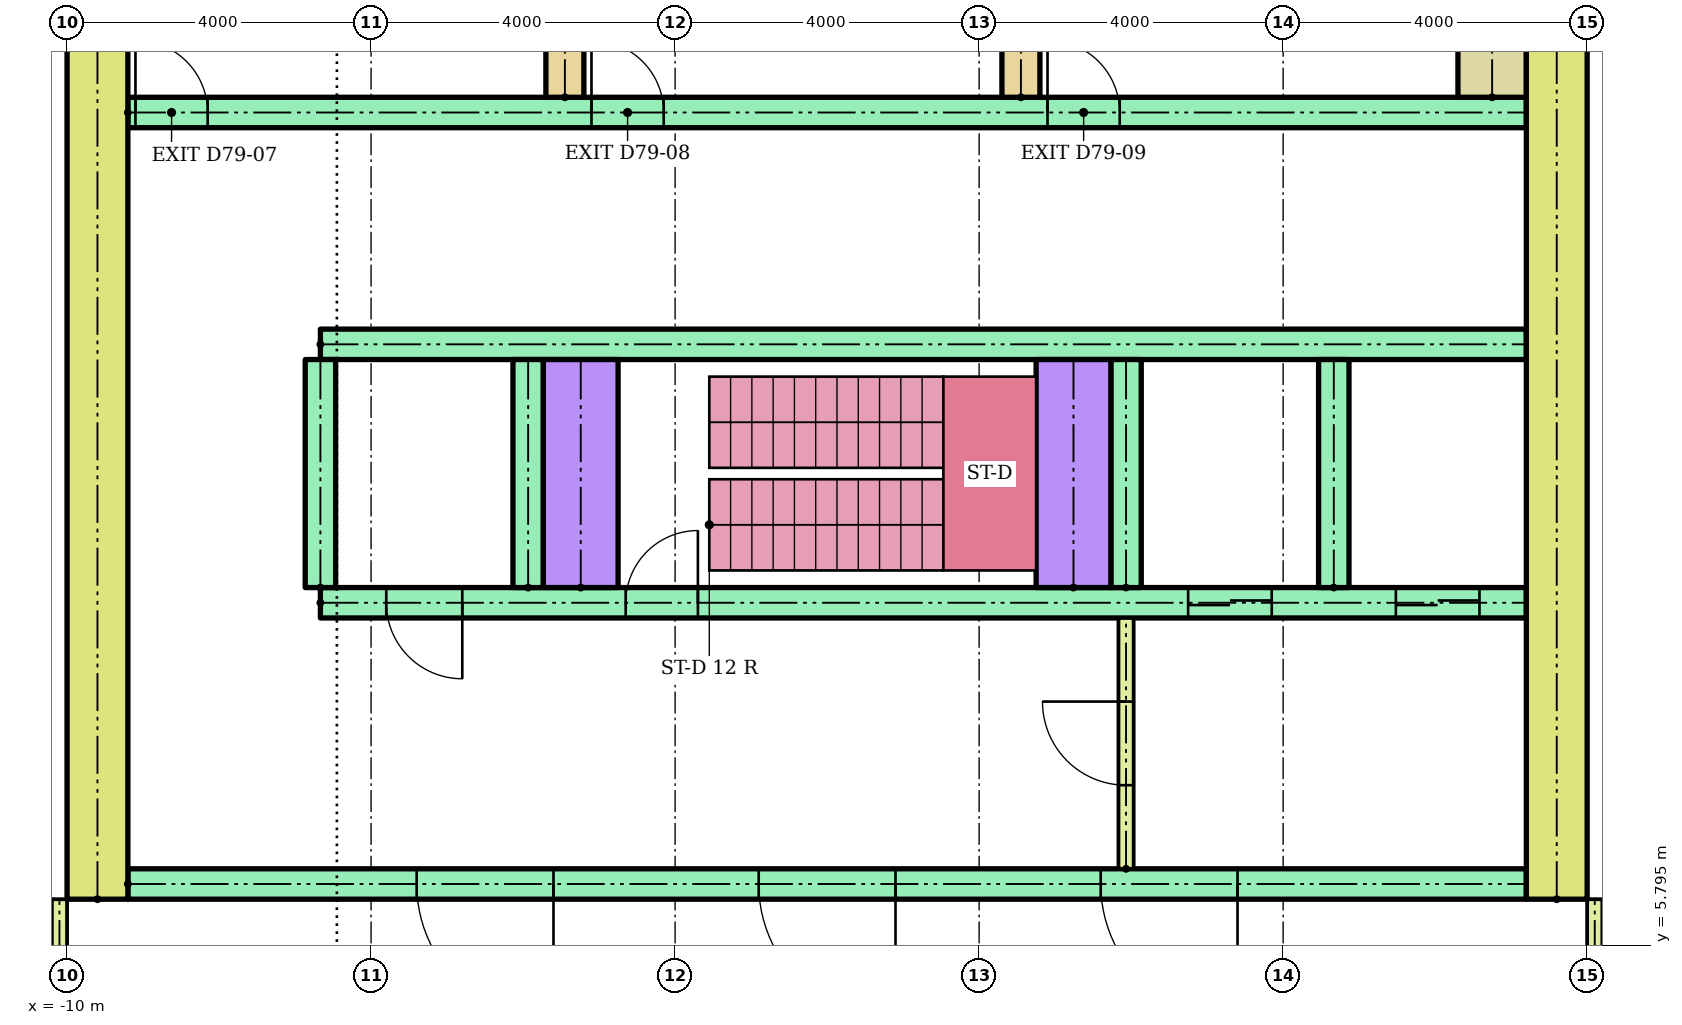
"""IFC4 building model, lengths in metres.
Left out: names, types, materials, properties, quantities, classifications, styles, units other than length and angle.
Written with IfcOpenShell. Run it as: python <this file> out.ifc"""

import sys

from ifc_helpers import new_model, si_unit, direction, frame, frame_2d, origin, place, context, subcontext, project, spatial, rectangle, extrude, element, fill, save


model = new_model("IFC4")
c1 = context("Model", 3, precision=1e-05, world=origin(), true_north=direction((0.0, 1.0)))
c2 = subcontext(c1, "Body", "Model", "MODEL_VIEW")
j1 = project(units=[si_unit("LENGTHUNIT", "METRE"), si_unit("PLANEANGLEUNIT", "RADIAN")], contexts=[c1])
p1 = place(None, origin())
s1 = spatial("IfcSite", under=j1, at=p1, CompositionType="ELEMENT")
p2 = place(p1, origin())
s2 = spatial("IfcBuilding", under=s1, at=p2, CompositionType="ELEMENT")
p3 = place(p2, frame((0.0, 0.0, 309.2)))
s3 = spatial("IfcBuildingStorey", under=s2, at=p3, CompositionType="ELEMENT", Elevation=309.2)
for number, where, z_axis, x_axis in (
    (1, (-9.6, 6.4, 0.0), (0.0, 0.0, 1.0), (0.0, 1.0, 0.0)),
    (2, (9.6, 6.4, 0.0), (0.0, 0.0, 1.0), (0.0, 1.0, 0.0)),
):
    element("IfcWall", number, at=place(p3, frame(where, z_axis=z_axis, x_axis=x_axis)), inside=s3, PredefinedType="SHEAR", context=c2, shape_type="SweptSolid", body=[
        extrude(rectangle(XDim=13.6, YDim=0.8, at=frame_2d((6.8, 0.0))), origin(), (0.0, 0.0, 1.0), 3.78),
    ])
p4 = place(p3, frame((-9.2, 6.6, 0.0)))
e3 = element("IfcWall", 3, at=p4, inside=s3, PredefinedType="SHEAR", context=c2, shape_type="SweptSolid", body=[
    extrude(rectangle(XDim=18.4, YDim=0.4, at=frame_2d((9.2, 0.0))), origin(), (0.0, 0.0, 1.0), 3.78),
])
p5 = place(p4, frame((8.3, 0.0, 0.0)))
e4 = element("IfcOpeningElement", 4, at=p5, cuts=e3, PredefinedType="OPENING", context=c2, shape_type="SweptSolid", body=[
    extrude(rectangle(XDim=1.8, YDim=2.1, at=frame_2d((0.9, 1.05))), frame((0.0, 0.21, 0.0), z_axis=(0.0, -1.0, 0.0), x_axis=(1.0, 0.0, 0.0)), (0.0, 0.0, 1.0), 0.42),
])
p6 = place(p4, frame((3.8, 0.0, 0.0)))
e5 = element("IfcOpeningElement", 5, at=p6, cuts=e3, PredefinedType="OPENING", context=c2, shape_type="SweptSolid", body=[
    extrude(rectangle(XDim=1.8, YDim=2.1, at=frame_2d((0.9, 1.05))), frame((0.0, 0.21, 0.0), z_axis=(0.0, -1.0, 0.0), x_axis=(1.0, 0.0, 0.0)), (0.0, 0.0, 1.0), 0.42),
])
p7 = place(p4, frame((12.8, 0.0, 0.0)))
e6 = element("IfcOpeningElement", 6, at=p7, cuts=e3, PredefinedType="OPENING", context=c2, shape_type="SweptSolid", body=[
    extrude(rectangle(XDim=1.8, YDim=2.1, at=frame_2d((0.9, 1.05))), frame((0.0, 0.21, 0.0), z_axis=(0.0, -1.0, 0.0), x_axis=(1.0, 0.0, 0.0)), (0.0, 0.0, 1.0), 0.42),
])
p8 = place(p3, frame((-6.667, 10.3, 0.0)))
e7 = element("IfcWall", 7, at=p8, inside=s3, PredefinedType="SHEAR", context=c2, shape_type="SweptSolid", body=[
    extrude(rectangle(XDim=15.867, YDim=0.4, at=frame_2d((7.933, 0.0))), origin(), (0.0, 0.0, 1.0), 3.78),
])
p9 = place(p8, frame((11.417, 0.0, 0.0)))
e8 = element("IfcOpeningElement", 8, at=p9, cuts=e7, PredefinedType="OPENING", context=c2, shape_type="SweptSolid", body=[
    extrude(rectangle(XDim=1.1, YDim=2.1, at=frame_2d((0.55, 1.05))), frame((0.0, 0.21, 0.0), z_axis=(0.0, -1.0, 0.0), x_axis=(1.0, 0.0, 0.0)), (0.0, 0.0, 1.0), 0.42),
])
p10 = place(p8, frame((14.15, 0.0, 0.0)))
e9 = element("IfcOpeningElement", 9, at=p10, cuts=e7, PredefinedType="OPENING", context=c2, shape_type="SweptSolid", body=[
    extrude(rectangle(XDim=1.1, YDim=2.1, at=frame_2d((0.55, 1.05))), frame((0.0, 0.21, 0.0), z_axis=(0.0, -1.0, 0.0), x_axis=(1.0, 0.0, 0.0)), (0.0, 0.0, 1.0), 0.42),
])
p11 = place(p8, frame((0.867, 0.0, 0.0)))
e10 = element("IfcOpeningElement", 10, at=p11, cuts=e7, PredefinedType="OPENING", context=c2, shape_type="SweptSolid", body=[
    extrude(rectangle(XDim=1.0, YDim=2.1, at=frame_2d((0.5, 1.05))), frame((0.0, 0.21, 0.0), z_axis=(0.0, -1.0, 0.0), x_axis=(1.0, 0.0, 0.0)), (0.0, 0.0, 1.0), 0.42),
])
p12 = place(p8, frame((4.017, 0.0, 0.0)))
e11 = element("IfcOpeningElement", 11, at=p12, cuts=e7, PredefinedType="OPENING", context=c2, shape_type="SweptSolid", body=[
    extrude(rectangle(XDim=0.95, YDim=2.1, at=frame_2d((0.475, 1.05))), frame((0.0, 0.21, 0.0), z_axis=(0.0, -1.0, 0.0), x_axis=(1.0, 0.0, 0.0)), (0.0, 0.0, 1.0), 0.42),
])
p13 = place(p3, frame((-6.667, 13.7, 0.0)))
e12 = element("IfcWall", 12, at=p13, inside=s3, PredefinedType="SHEAR", context=c2, shape_type="SweptSolid", body=[
    extrude(rectangle(XDim=15.867, YDim=0.4, at=frame_2d((7.933, 0.0))), origin(), (0.0, 0.0, 1.0), 3.78),
])
for number, where, z_axis, x_axis in (
    (13, (-6.667, 10.5, 0.0), (0.0, 0.0, 1.0), (0.0, 1.0, 0.0)),
    (14, (-3.933, 10.5, 0.0), (0.0, 0.0, 1.0), (0.0, 1.0, 0.0)),
    (15, (3.933, 10.5, 0.0), (0.0, 0.0, 1.0), (0.0, 1.0, 0.0)),
    (16, (6.667, 10.5, 0.0), (0.0, 0.0, 1.0), (0.0, 1.0, 0.0)),
):
    element("IfcWall", number, at=place(p3, frame(where, z_axis=z_axis, x_axis=x_axis)), inside=s3, PredefinedType="SHEAR", context=c2, shape_type="SweptSolid", body=[
        extrude(rectangle(XDim=3.0, YDim=0.4, at=frame_2d((1.5, 0.0))), origin(), (0.0, 0.0, 1.0), 3.78),
    ])
for number, where, z_axis, x_axis in (
    (17, (-3.242, 10.5, 0.0), (0.0, 0.0, 1.0), (0.0, 1.0, 0.0)),
    (18, (3.242, 10.5, 0.0), (0.0, 0.0, 1.0), (0.0, 1.0, 0.0)),
):
    element("IfcWall", number, at=place(p3, frame(where, z_axis=z_axis, x_axis=x_axis)), inside=s3, PredefinedType="SHEAR", context=c2, shape_type="SweptSolid", body=[
        extrude(rectangle(XDim=3.0, YDim=0.983, at=frame_2d((1.5, 0.0))), origin(), (0.0, 0.0, 1.0), 3.78),
    ])
p14 = place(p3, frame((3.933, 6.8, 0.0), z_axis=(0.0, 0.0, 1.0), x_axis=(0.0, 1.0, 0.0)))
e19 = element("IfcWall", 19, at=p14, inside=s3, PredefinedType="PARTITIONING", context=c2, shape_type="SweptSolid", body=[
    extrude(rectangle(XDim=3.3, YDim=0.2, at=frame_2d((1.65, 0.0))), origin(), (0.0, 0.0, 1.0), 3.78),
])
p15 = place(p14, frame((1.1, 0.0, 0.0)))
e20 = element("IfcOpeningElement", 20, at=p15, cuts=e19, PredefinedType="OPENING", context=c2, shape_type="SweptSolid", body=[
    extrude(rectangle(XDim=1.1, YDim=2.1, at=frame_2d((0.55, 1.05))), frame((0.0, 0.11, 0.0), z_axis=(0.0, -1.0, 0.0), x_axis=(1.0, 0.0, 0.0)), (0.0, 0.0, 1.0), 0.22),
])
p16 = place(p3, frame((-9.2, 16.75, 0.0)))
e21 = element("IfcWall", 21, at=p16, inside=s3, PredefinedType="SHEAR", context=c2, shape_type="SweptSolid", body=[
    extrude(rectangle(XDim=18.4, YDim=0.4, at=frame_2d((9.2, 0.0))), origin(), (0.0, 0.0, 1.0), 3.78),
])
p17 = place(p16, frame((0.1, 0.0, 0.0)))
e22 = element("IfcOpeningElement", 22, at=p17, cuts=e21, PredefinedType="OPENING", context=c2, shape_type="SweptSolid", body=[
    extrude(rectangle(XDim=0.95, YDim=2.1, at=frame_2d((0.475, 1.05))), frame((0.0, 0.21, 0.0), z_axis=(0.0, -1.0, 0.0), x_axis=(1.0, 0.0, 0.0)), (0.0, 0.0, 1.0), 0.42),
])
p18 = place(p16, frame((6.1, 0.0, 0.0)))
e23 = element("IfcOpeningElement", 23, at=p18, cuts=e21, PredefinedType="OPENING", context=c2, shape_type="SweptSolid", body=[
    extrude(rectangle(XDim=0.95, YDim=2.1, at=frame_2d((0.475, 1.05))), frame((0.0, 0.21, 0.0), z_axis=(0.0, -1.0, 0.0), x_axis=(1.0, 0.0, 0.0)), (0.0, 0.0, 1.0), 0.42),
])
p19 = place(p16, frame((12.1, 0.0, 0.0)))
e24 = element("IfcOpeningElement", 24, at=p19, cuts=e21, PredefinedType="OPENING", context=c2, shape_type="SweptSolid", body=[
    extrude(rectangle(XDim=0.95, YDim=2.1, at=frame_2d((0.475, 1.05))), frame((0.0, 0.21, 0.0), z_axis=(0.0, -1.0, 0.0), x_axis=(1.0, 0.0, 0.0)), (0.0, 0.0, 1.0), 0.42),
])
for number, where, z_axis, x_axis in (
    (25, (-3.45, 16.95, 0.0), (0.0, 0.0, 1.0), (0.0, 1.0, 0.0)),
    (26, (2.55, 16.95, 0.0), (0.0, 0.0, 1.0), (0.0, 1.0, 0.0)),
):
    element("IfcWall", number, at=place(p3, frame(where, z_axis=z_axis, x_axis=x_axis)), inside=s3, PredefinedType="SHEAR", context=c2, shape_type="SweptSolid", body=[
        extrude(rectangle(XDim=2.55, YDim=0.5, at=frame_2d((1.275, 0.0))), origin(), (0.0, 0.0, 1.0), 3.78),
    ])
p20 = place(p3, frame((8.75, 16.95, 0.0), z_axis=(0.0, 0.0, 1.0), x_axis=(0.0, 1.0, 0.0)))
e27 = element("IfcWall", 27, at=p20, inside=s3, PredefinedType="SHEAR", context=c2, shape_type="SweptSolid", body=[
    extrude(rectangle(XDim=2.55, YDim=0.9, at=frame_2d((1.275, 0.0))), origin(), (0.0, 0.0, 1.0), 3.78),
])
for number, where, z_axis, x_axis in (
    (28, (-10.1, 1.5, 0.0), (0.0, 0.0, 1.0), (0.0, 1.0, 0.0)),
    (29, (10.1, 1.5, 0.0), (0.0, 0.0, 1.0), (0.0, 1.0, 0.0)),
):
    element("IfcWall", number, at=place(p3, frame(where, z_axis=z_axis, x_axis=x_axis)), inside=s3, PredefinedType="PARTITIONING", context=c2, shape_type="SweptSolid", body=[
        extrude(rectangle(XDim=4.9, YDim=0.2, at=frame_2d((2.45, 0.0))), origin(), (0.0, 0.0, 1.0), 3.78),
    ])
p21 = place(p5, frame((1.8, 0.0, 0.0), z_axis=(0.0, 0.0, 1.0), x_axis=(-1.0, 0.0, 0.0)))
e30 = element("IfcDoor", 30, at=p21, inside=s3, OperationType="DOUBLE_DOOR_SINGLE_SWING", PredefinedType="DOOR", context=c2, shape_type="SweptSolid", body=[
    extrude(rectangle(XDim=1.8, YDim=2.1, at=frame_2d((0.9, 1.05))), frame((0.0, 0.025, 0.0), z_axis=(0.0, -1.0, 0.0), x_axis=(1.0, 0.0, 0.0)), (0.0, 0.0, 1.0), 0.05),
])
fill(e4, e30)
p22 = place(p6, frame((1.8, 0.0, 0.0), z_axis=(0.0, 0.0, 1.0), x_axis=(-1.0, 0.0, 0.0)))
e31 = element("IfcDoor", 31, at=p22, inside=s3, OperationType="DOUBLE_DOOR_SINGLE_SWING", PredefinedType="DOOR", context=c2, shape_type="SweptSolid", body=[
    extrude(rectangle(XDim=1.8, YDim=2.1, at=frame_2d((0.9, 1.05))), frame((0.0, 0.025, 0.0), z_axis=(0.0, -1.0, 0.0), x_axis=(1.0, 0.0, 0.0)), (0.0, 0.0, 1.0), 0.05),
])
fill(e5, e31)
p23 = place(p7, frame((1.8, 0.0, 0.0), z_axis=(0.0, 0.0, 1.0), x_axis=(-1.0, 0.0, 0.0)))
e32 = element("IfcDoor", 32, at=p23, inside=s3, OperationType="DOUBLE_DOOR_SINGLE_SWING", PredefinedType="DOOR", context=c2, shape_type="SweptSolid", body=[
    extrude(rectangle(XDim=1.8, YDim=2.1, at=frame_2d((0.9, 1.05))), frame((0.0, 0.025, 0.0), z_axis=(0.0, -1.0, 0.0), x_axis=(1.0, 0.0, 0.0)), (0.0, 0.0, 1.0), 0.05),
])
fill(e6, e32)
p24 = place(p9, origin())
e33 = element("IfcDoor", 33, at=p24, inside=s3, OperationType="SLIDING_TO_LEFT", PredefinedType="DOOR", context=c2, shape_type="SweptSolid", body=[
    extrude(rectangle(XDim=1.1, YDim=2.1, at=frame_2d((0.55, 1.05))), frame((0.0, 0.025, 0.0), z_axis=(0.0, -1.0, 0.0), x_axis=(1.0, 0.0, 0.0)), (0.0, 0.0, 1.0), 0.05),
])
fill(e8, e33)
p25 = place(p10, origin())
e34 = element("IfcDoor", 34, at=p25, inside=s3, OperationType="SLIDING_TO_LEFT", PredefinedType="DOOR", context=c2, shape_type="SweptSolid", body=[
    extrude(rectangle(XDim=1.1, YDim=2.1, at=frame_2d((0.55, 1.05))), frame((0.0, 0.025, 0.0), z_axis=(0.0, -1.0, 0.0), x_axis=(1.0, 0.0, 0.0)), (0.0, 0.0, 1.0), 0.05),
])
fill(e9, e34)
p26 = place(p11, frame((1.0, 0.0, 0.0), z_axis=(0.0, 0.0, 1.0), x_axis=(-1.0, 0.0, 0.0)))
e35 = element("IfcDoor", 35, at=p26, inside=s3, OperationType="SINGLE_SWING_RIGHT", PredefinedType="DOOR", context=c2, shape_type="SweptSolid", body=[
    extrude(rectangle(XDim=1.0, YDim=2.1, at=frame_2d((0.5, 1.05))), frame((0.0, 0.025, 0.0), z_axis=(0.0, -1.0, 0.0), x_axis=(1.0, 0.0, 0.0)), (0.0, 0.0, 1.0), 0.05),
])
fill(e10, e35)
p27 = place(p12, origin())
e36 = element("IfcDoor", 36, at=p27, inside=s3, OperationType="SINGLE_SWING_RIGHT", PredefinedType="DOOR", context=c2, shape_type="SweptSolid", body=[
    extrude(rectangle(XDim=0.95, YDim=2.1, at=frame_2d((0.475, 1.05))), frame((0.0, 0.025, 0.0), z_axis=(0.0, -1.0, 0.0), x_axis=(1.0, 0.0, 0.0)), (0.0, 0.0, 1.0), 0.05),
])
fill(e11, e36)
p28 = place(p15, origin())
e37 = element("IfcDoor", 37, at=p28, inside=s3, OperationType="SINGLE_SWING_RIGHT", PredefinedType="DOOR", context=c2, shape_type="SweptSolid", body=[
    extrude(rectangle(XDim=1.1, YDim=2.1, at=frame_2d((0.55, 1.05))), frame((0.0, 0.025, 0.0), z_axis=(0.0, -1.0, 0.0), x_axis=(1.0, 0.0, 0.0)), (0.0, 0.0, 1.0), 0.05),
])
fill(e20, e37)
p29 = place(p17, origin())
e38 = element("IfcDoor", 38, at=p29, inside=s3, OperationType="SINGLE_SWING_LEFT", PredefinedType="DOOR", context=c2, shape_type="SweptSolid", body=[
    extrude(rectangle(XDim=0.95, YDim=2.1, at=frame_2d((0.475, 1.05))), frame((0.0, 0.025, 0.0), z_axis=(0.0, -1.0, 0.0), x_axis=(1.0, 0.0, 0.0)), (0.0, 0.0, 1.0), 0.05),
])
fill(e22, e38)
p30 = place(p18, origin())
e39 = element("IfcDoor", 39, at=p30, inside=s3, OperationType="SINGLE_SWING_LEFT", PredefinedType="DOOR", context=c2, shape_type="SweptSolid", body=[
    extrude(rectangle(XDim=0.95, YDim=2.1, at=frame_2d((0.475, 1.05))), frame((0.0, 0.025, 0.0), z_axis=(0.0, -1.0, 0.0), x_axis=(1.0, 0.0, 0.0)), (0.0, 0.0, 1.0), 0.05),
])
fill(e23, e39)
p31 = place(p19, origin())
e40 = element("IfcDoor", 40, at=p31, inside=s3, OperationType="SINGLE_SWING_LEFT", PredefinedType="DOOR", context=c2, shape_type="SweptSolid", body=[
    extrude(rectangle(XDim=0.95, YDim=2.1, at=frame_2d((0.475, 1.05))), frame((0.0, 0.025, 0.0), z_axis=(0.0, -1.0, 0.0), x_axis=(1.0, 0.0, 0.0)), (0.0, 0.0, 1.0), 0.05),
])
fill(e24, e40)
save(model, sys.argv[1])
